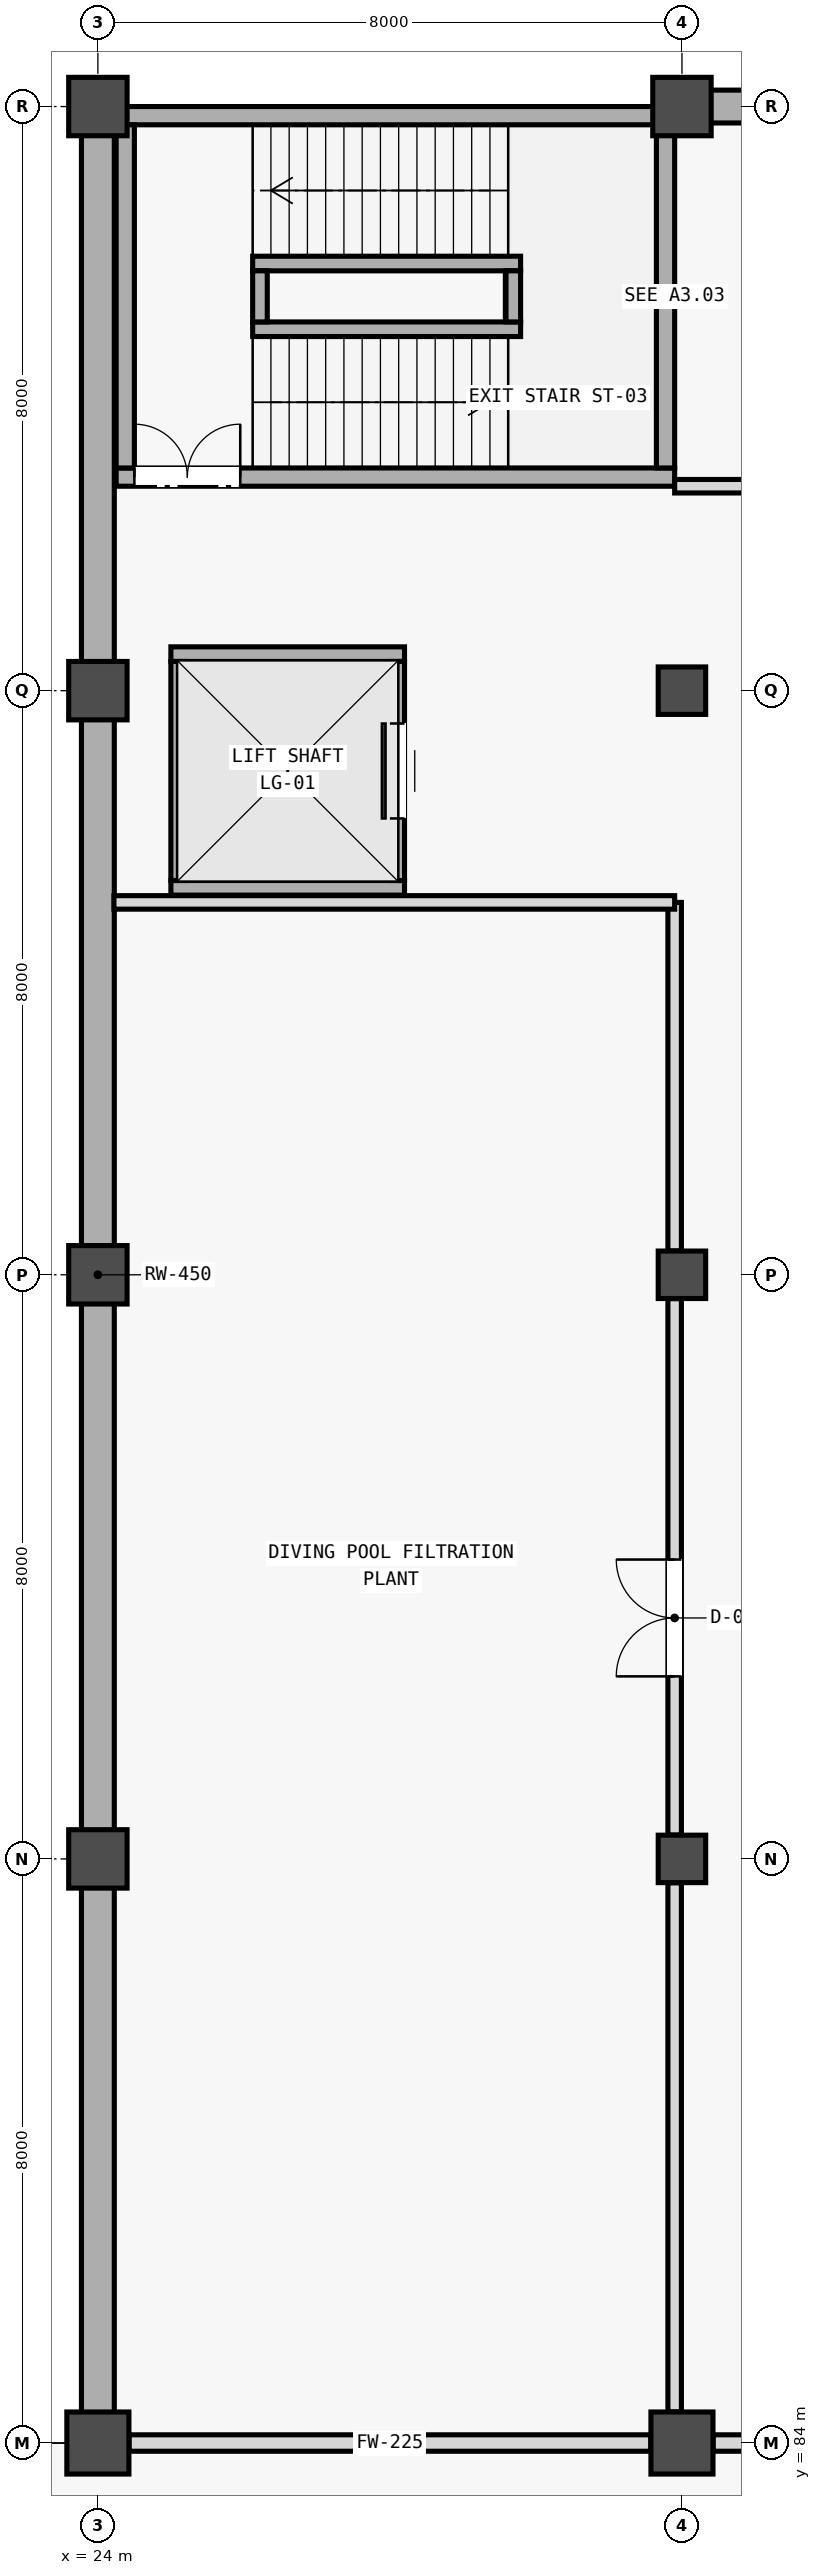
"""IFC4 building model, lengths in metres.
Left out: names, types, materials, properties, quantities, classifications, styles, units other than length and angle.
Written with IfcOpenShell. Run it as: python <this file> out.ifc"""

import sys

from ifc_helpers import new_model, si_unit, direction, frame, frame_2d, origin, origin_2d, place, context, subcontext, project, spatial, rectangle, extrude, element, fill, save


model = new_model("IFC4")
c1 = context("Model", 3, precision=1e-05, world=origin(), true_north=direction((0.0, 1.0)))
c2 = subcontext(c1, "Body", "Model", "MODEL_VIEW")
j1 = project(units=[si_unit("LENGTHUNIT", "METRE"), si_unit("PLANEANGLEUNIT", "RADIAN")], contexts=[c1])
p1 = place(None, origin())
s1 = spatial("IfcSite", under=j1, at=p1, CompositionType="ELEMENT")
p2 = place(p1, origin())
s2 = spatial("IfcBuilding", under=s1, at=p2, CompositionType="ELEMENT")
p3 = place(p2, frame((0.0, 0.0, -4.8)))
s3 = spatial("IfcBuildingStorey", under=s2, at=p3, CompositionType="ELEMENT", Elevation=-4.8)
for number, where, z_axis, x_axis in (
    (1, (24.0, 84.0, 0.0), (0.0, 0.0, 1.0), (1.0, 0.0, 0.0)),
    (2, (32.0, 84.0, 0.0), (0.0, 0.0, 1.0), (1.0, 0.0, 0.0)),
):
    element("IfcColumn", number, at=place(p3, frame(where, z_axis=z_axis, x_axis=x_axis)), inside=s3, PredefinedType="COLUMN", context=c2, shape_type="SweptSolid", body=[
        extrude(rectangle(XDim=0.85, YDim=0.85, at=origin_2d()), origin(), (0.0, 0.0, 1.0), 4.47),
    ])
for number, where, z_axis, x_axis in (
    (3, (24.0, 116.0, 0.0), (0.0, 0.0, 1.0), (1.0, 0.0, 0.0)),
    (4, (32.0, 116.0, 0.0), (0.0, 0.0, 1.0), (1.0, 0.0, 0.0)),
    (5, (24.0, 92.0, 0.0), (0.0, 0.0, 1.0), (1.0, 0.0, 0.0)),
):
    element("IfcColumn", number, at=place(p3, frame(where, z_axis=z_axis, x_axis=x_axis)), inside=s3, PredefinedType="COLUMN", context=c2, shape_type="SweptSolid", body=[
        extrude(rectangle(XDim=0.8, YDim=0.8, at=origin_2d()), origin(), (0.0, 0.0, 1.0), 4.47),
    ])
p4 = place(p3, frame((32.0, 92.0, 0.0), z_axis=(0.0, 0.0, 1.0), x_axis=(1.0, 0.0, 0.0)))
e6 = element("IfcColumn", 6, at=p4, inside=s3, PredefinedType="COLUMN", context=c2, shape_type="SweptSolid", body=[
    extrude(rectangle(XDim=0.65, YDim=0.65, at=origin_2d()), origin(), (0.0, 0.0, 1.0), 4.47),
])
p5 = place(p3, frame((24.0, 100.0, 0.0), z_axis=(0.0, 0.0, 1.0), x_axis=(1.0, 0.0, 0.0)))
e7 = element("IfcColumn", 7, at=p5, inside=s3, PredefinedType="COLUMN", context=c2, shape_type="SweptSolid", body=[
    extrude(rectangle(XDim=0.8, YDim=0.8, at=origin_2d()), origin(), (0.0, 0.0, 1.0), 4.47),
])
p6 = place(p3, frame((32.0, 100.0, 0.0), z_axis=(0.0, 0.0, 1.0), x_axis=(1.0, 0.0, 0.0)))
e8 = element("IfcColumn", 8, at=p6, inside=s3, PredefinedType="COLUMN", context=c2, shape_type="SweptSolid", body=[
    extrude(rectangle(XDim=0.65, YDim=0.65, at=origin_2d()), origin(), (0.0, 0.0, 1.0), 4.47),
])
p7 = place(p3, frame((24.0, 108.0, 0.0), z_axis=(0.0, 0.0, 1.0), x_axis=(1.0, 0.0, 0.0)))
e9 = element("IfcColumn", 9, at=p7, inside=s3, PredefinedType="COLUMN", context=c2, shape_type="SweptSolid", body=[
    extrude(rectangle(XDim=0.8, YDim=0.8, at=origin_2d()), origin(), (0.0, 0.0, 1.0), 4.47),
])
p8 = place(p3, frame((32.0, 108.0, 0.0), z_axis=(0.0, 0.0, 1.0), x_axis=(1.0, 0.0, 0.0)))
e10 = element("IfcColumn", 10, at=p8, inside=s3, PredefinedType="COLUMN", context=c2, shape_type="SweptSolid", body=[
    extrude(rectangle(XDim=0.65, YDim=0.65, at=origin_2d()), origin(), (0.0, 0.0, 1.0), 4.47),
])
p9 = place(p3, frame((31.902, 116.0, 0.0), z_axis=(0.0, 0.0, 1.0), x_axis=(1.0, 0.0, 0.0)))
e11 = element("IfcWall", 11, at=p9, inside=s3, PredefinedType="SOLIDWALL", context=c2, shape_type="SweptSolid", body=[
    extrude(rectangle(XDim=40.098, YDim=0.45, at=frame_2d((20.049, 0.0))), origin(), (0.0, 0.0, 1.0), 4.47),
])
p10 = place(p3, frame((24.0, 84.0, 0.0), z_axis=(0.0, 0.0, 1.0), x_axis=(0.0, 1.0, 0.0)))
e12 = element("IfcWall", 12, at=p10, inside=s3, PredefinedType="SOLIDWALL", context=c2, shape_type="SweptSolid", body=[
    extrude(rectangle(XDim=32.0, YDim=0.45, at=frame_2d((16.0, 0.0))), origin(), (0.0, 0.0, 1.0), 4.47),
])
p11 = place(p3, frame((24.25, 110.925, 0.0), z_axis=(0.0, 0.0, 1.0), x_axis=(1.0, 0.0, 0.0)))
e13 = element("IfcWall", 13, at=p11, inside=s3, PredefinedType="SHEAR", context=c2, shape_type="SweptSolid", body=[
    extrude(rectangle(XDim=7.65, YDim=0.25, at=frame_2d((3.825, 0.0))), origin(), (0.0, 0.0, 1.0), 4.8),
])
p12 = place(p11, frame((0.25, 0.0, 0.0)))
e14 = element("IfcOpeningElement", 14, at=p12, cuts=e13, PredefinedType="OPENING", context=c2, shape_type="SweptSolid", body=[
    extrude(rectangle(XDim=1.45, YDim=2.2, at=frame_2d((0.725, 1.1))), frame((0.0, 0.135, 0.0), z_axis=(0.0, -1.0, 0.0), x_axis=(1.0, 0.0, 0.0)), (0.0, 0.0, 1.0), 0.27),
])
p13 = place(p3, frame((24.25, 115.875, 0.0), z_axis=(0.0, 0.0, 1.0), x_axis=(1.0, 0.0, 0.0)))
e15 = element("IfcWall", 15, at=p13, inside=s3, PredefinedType="SHEAR", context=c2, shape_type="SweptSolid", body=[
    extrude(rectangle(XDim=7.65, YDim=0.25, at=frame_2d((3.825, 0.0))), origin(), (0.0, 0.0, 1.0), 4.8),
])
for number, where, z_axis, x_axis in (
    (16, (24.375, 111.05, 0.0), (0.0, 0.0, 1.0), (0.0, 1.0, 0.0)),
    (17, (31.775, 111.05, 0.0), (0.0, 0.0, 1.0), (0.0, 1.0, 0.0)),
):
    element("IfcWall", number, at=place(p3, frame(where, z_axis=z_axis, x_axis=x_axis)), inside=s3, PredefinedType="SHEAR", context=c2, shape_type="SweptSolid", body=[
        extrude(rectangle(XDim=4.7, YDim=0.25, at=frame_2d((2.35, 0.0))), origin(), (0.0, 0.0, 1.0), 4.8),
    ])
for number, where, z_axis, x_axis in (
    (18, (26.12, 112.95, 0.0), (0.0, 0.0, 1.0), (1.0, 0.0, 0.0)),
    (19, (26.12, 113.85, 0.0), (0.0, 0.0, 1.0), (1.0, 0.0, 0.0)),
):
    element("IfcWall", number, at=place(p3, frame(where, z_axis=z_axis, x_axis=x_axis)), inside=s3, PredefinedType="SHEAR", context=c2, shape_type="SweptSolid", body=[
        extrude(rectangle(XDim=3.67, YDim=0.2, at=frame_2d((1.835, 0.0))), origin(), (0.0, 0.0, 1.0), 4.8),
    ])
for number, where, z_axis, x_axis in (
    (20, (26.22, 113.05, 0.0), (0.0, 0.0, 1.0), (0.0, 1.0, 0.0)),
    (21, (29.69, 113.05, 0.0), (0.0, 0.0, 1.0), (0.0, 1.0, 0.0)),
):
    element("IfcWall", number, at=place(p3, frame(where, z_axis=z_axis, x_axis=x_axis)), inside=s3, PredefinedType="SHEAR", context=c2, shape_type="SweptSolid", body=[
        extrude(rectangle(XDim=0.7, YDim=0.2, at=frame_2d((0.35, 0.0))), origin(), (0.0, 0.0, 1.0), 4.8),
    ])
for number, where, z_axis, x_axis in (
    (22, (25.0, 105.3, 0.0), (0.0, 0.0, 1.0), (1.0, 0.0, 0.0)),
    (23, (25.0, 108.5, 0.0), (0.0, 0.0, 1.0), (1.0, 0.0, 0.0)),
):
    element("IfcWall", number, at=place(p3, frame(where, z_axis=z_axis, x_axis=x_axis)), inside=s3, PredefinedType="SHEAR", context=c2, shape_type="SweptSolid", body=[
        extrude(rectangle(XDim=3.2, YDim=0.2, at=frame_2d((1.6, 0.0))), origin(), (0.0, 0.0, 1.0), 4.8),
    ])
p14 = place(p3, frame((25.1, 105.4, 0.0), z_axis=(0.0, 0.0, 1.0), x_axis=(0.0, 1.0, 0.0)))
e24 = element("IfcWall", 24, at=p14, inside=s3, PredefinedType="SHEAR", context=c2, shape_type="SweptSolid", body=[
    extrude(rectangle(XDim=3.0, YDim=0.2, at=frame_2d((1.5, 0.0))), origin(), (0.0, 0.0, 1.0), 4.8),
])
p15 = place(p3, frame((28.1, 105.4, 0.0), z_axis=(0.0, 0.0, 1.0), x_axis=(0.0, 1.0, 0.0)))
e25 = element("IfcWall", 25, at=p15, inside=s3, PredefinedType="SHEAR", context=c2, shape_type="SweptSolid", body=[
    extrude(rectangle(XDim=3.0, YDim=0.2, at=frame_2d((1.5, 0.0))), origin(), (0.0, 0.0, 1.0), 4.8),
])
p16 = place(p15, frame((0.85, 0.0, 0.0)))
e26 = element("IfcOpeningElement", 26, at=p16, cuts=e25, PredefinedType="OPENING", context=c2, shape_type="SweptSolid", body=[
    extrude(rectangle(XDim=1.3, YDim=2.3, at=frame_2d((0.65, 1.15))), frame((0.0, 0.11, 0.0), z_axis=(0.0, -1.0, 0.0), x_axis=(1.0, 0.0, 0.0)), (0.0, 0.0, 1.0), 0.22),
])
for number, where, z_axis, x_axis in (
    (27, (24.427, 84.0, 0.0), (0.0, 0.0, 1.0), (1.0, 0.0, 0.0)),
    (28, (32.427, 84.0, 0.0), (0.0, 0.0, 1.0), (1.0, 0.0, 0.0)),
):
    element("IfcWall", number, at=place(p3, frame(where, z_axis=z_axis, x_axis=x_axis)), inside=s3, PredefinedType="STANDARD", context=c2, shape_type="SweptSolid", body=[
        extrude(rectangle(XDim=7.146, YDim=0.225, at=frame_2d((3.573, 0.0))), origin(), (0.0, 0.0, 1.0), 3.65),
    ])
p17 = place(p3, frame((31.9, 84.427, 0.0), z_axis=(0.0, 0.0, 1.0), x_axis=(0.0, 1.0, 0.0)))
e29 = element("IfcWall", 29, at=p17, inside=s3, PredefinedType="STANDARD", context=c2, shape_type="SweptSolid", body=[
    extrude(rectangle(XDim=7.246, YDim=0.185, at=frame_2d((3.623, 0.0))), origin(), (0.0, 0.0, 1.0), 3.75),
])
p18 = place(p3, frame((31.9, 92.327, 0.0), z_axis=(0.0, 0.0, 1.0), x_axis=(0.0, 1.0, 0.0)))
e30 = element("IfcWall", 30, at=p18, inside=s3, PredefinedType="STANDARD", context=c2, shape_type="SweptSolid", body=[
    extrude(rectangle(XDim=7.346, YDim=0.185, at=frame_2d((3.673, 0.0))), origin(), (0.0, 0.0, 1.0), 3.75),
])
p19 = place(p18, frame((2.173, 0.0, 0.0)))
e31 = element("IfcOpeningElement", 31, at=p19, cuts=e30, PredefinedType="OPENING", context=c2, shape_type="SweptSolid", body=[
    extrude(rectangle(XDim=1.6, YDim=2.3, at=frame_2d((0.8, 1.15))), frame((0.0, 0.103, 0.0), z_axis=(0.0, -1.0, 0.0), x_axis=(1.0, 0.0, 0.0)), (0.0, 0.0, 1.0), 0.205),
])
p20 = place(p3, frame((31.9, 100.327, 0.0), z_axis=(0.0, 0.0, 1.0), x_axis=(0.0, 1.0, 0.0)))
e32 = element("IfcWall", 32, at=p20, inside=s3, PredefinedType="STANDARD", context=c2, shape_type="SweptSolid", body=[
    extrude(rectangle(XDim=4.773, YDim=0.185, at=frame_2d((2.387, 0.0))), origin(), (0.0, 0.0, 1.0), 3.75),
])
p21 = place(p3, frame((24.22, 105.1, 0.0), z_axis=(0.0, 0.0, 1.0), x_axis=(1.0, 0.0, 0.0)))
e33 = element("IfcWall", 33, at=p21, inside=s3, PredefinedType="STANDARD", context=c2, shape_type="SweptSolid", body=[
    extrude(rectangle(XDim=7.68, YDim=0.185, at=frame_2d((3.84, 0.0))), origin(), (0.0, 0.0, 1.0), 3.75),
])
p22 = place(p3, frame((31.9, 110.8, 0.0), z_axis=(0.0, 0.0, 1.0), x_axis=(1.0, 0.0, 0.0)))
e34 = element("IfcWall", 34, at=p22, inside=s3, PredefinedType="STANDARD", context=c2, shape_type="SweptSolid", body=[
    extrude(rectangle(XDim=26.7, YDim=0.185, at=frame_2d((13.35, 0.0))), origin(), (0.0, 0.0, 1.0), 3.75),
])
p23 = place(p12, origin())
e35 = element("IfcDoor", 35, at=p23, inside=s3, OperationType="DOUBLE_DOOR_SINGLE_SWING", PredefinedType="DOOR", context=c2, shape_type="SweptSolid", body=[
    extrude(rectangle(XDim=1.45, YDim=2.2, at=frame_2d((0.725, 1.1))), frame((0.0, 0.025, 0.0), z_axis=(0.0, -1.0, 0.0), x_axis=(1.0, 0.0, 0.0)), (0.0, 0.0, 1.0), 0.05),
])
fill(e14, e35)
p24 = place(p16, origin())
e36 = element("IfcDoor", 36, at=p24, inside=s3, OperationType="SLIDING_TO_RIGHT", PredefinedType="DOOR", context=c2, shape_type="SweptSolid", body=[
    extrude(rectangle(XDim=1.3, YDim=2.3, at=frame_2d((0.65, 1.15))), frame((0.0, 0.025, 0.0), z_axis=(0.0, -1.0, 0.0), x_axis=(1.0, 0.0, 0.0)), (0.0, 0.0, 1.0), 0.05),
])
fill(e26, e36)
p25 = place(p19, origin())
e37 = element("IfcDoor", 37, at=p25, inside=s3, OperationType="DOUBLE_DOOR_SINGLE_SWING", PredefinedType="DOOR", context=c2, shape_type="SweptSolid", body=[
    extrude(rectangle(XDim=1.6, YDim=2.3, at=frame_2d((0.8, 1.15))), frame((0.0, 0.025, 0.0), z_axis=(0.0, -1.0, 0.0), x_axis=(1.0, 0.0, 0.0)), (0.0, 0.0, 1.0), 0.05),
])
fill(e31, e37)
save(model, sys.argv[1])
